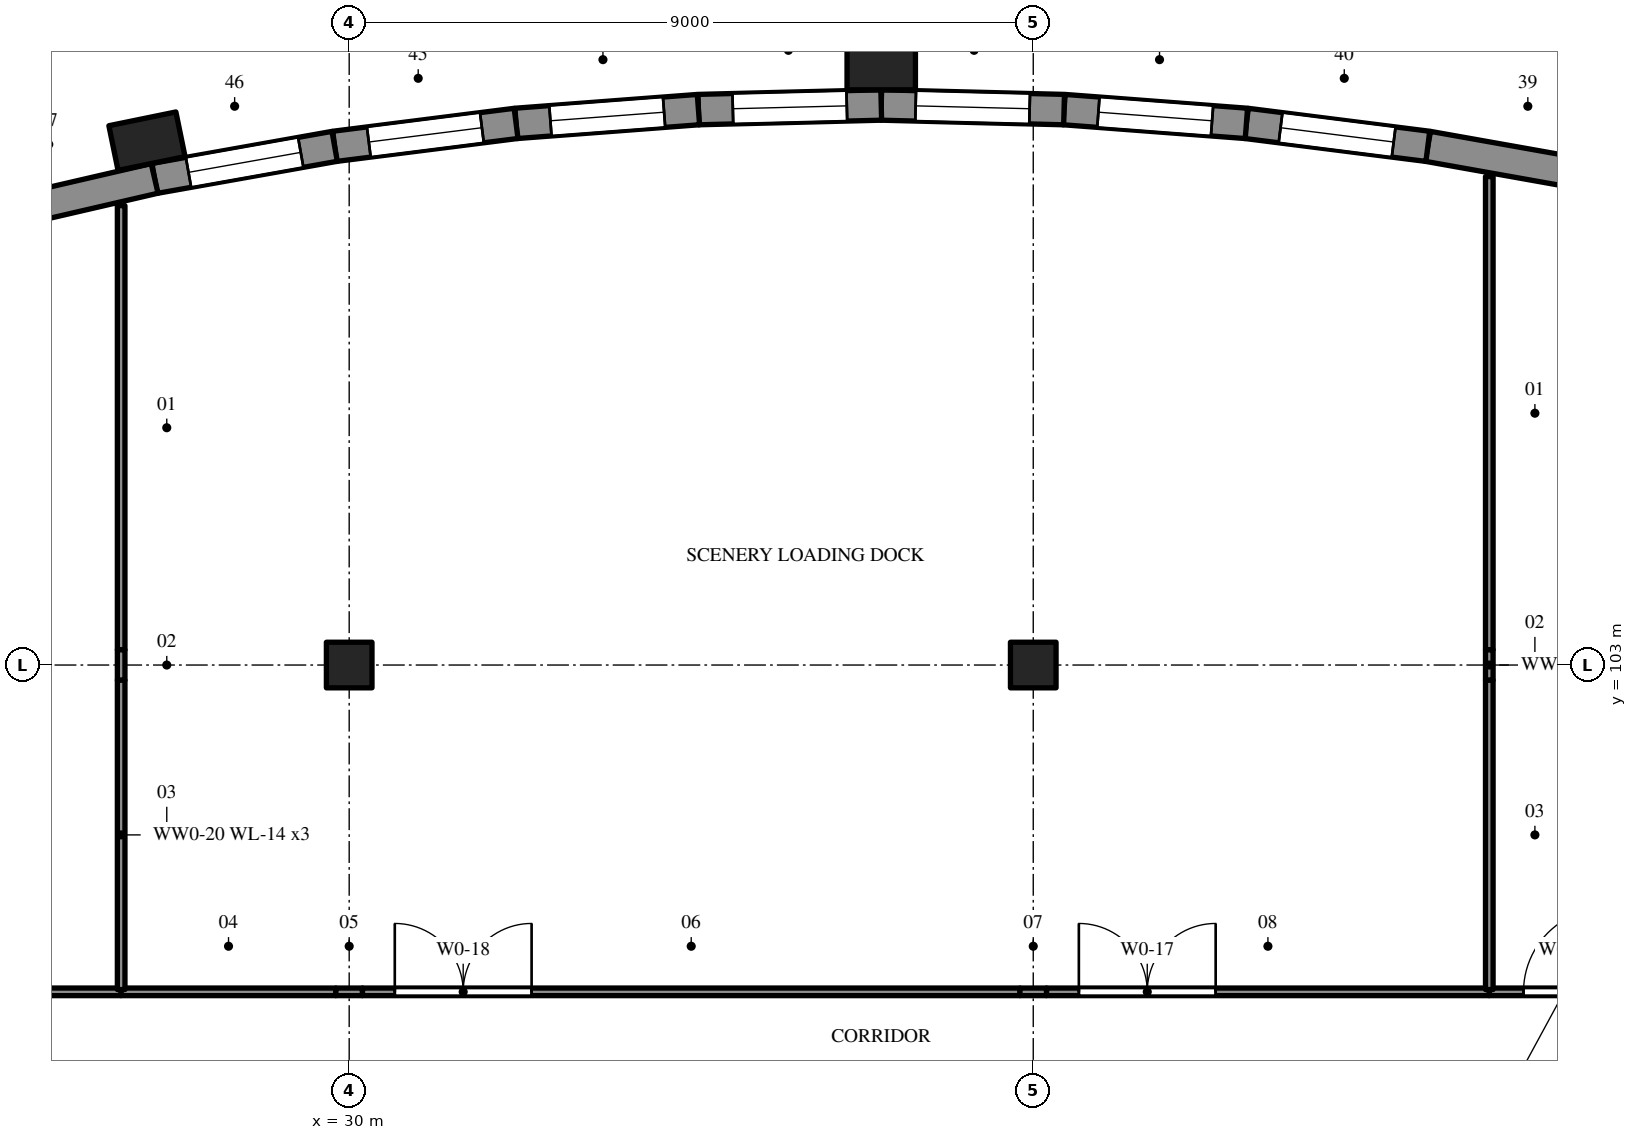
"""IFC4 building model, lengths in metres.
Left out: names, types, materials, properties, quantities, classifications, styles, units other than length and angle.
Written with IfcOpenShell. Run it as: python <this file> out.ifc"""

import sys

from ifc_helpers import new_model, si_unit, direction, frame, frame_2d, origin, origin_2d, place, context, subcontext, project, spatial, rectangle, extrude, element, fill, save


model = new_model("IFC4")
c1 = context("Model", 3, precision=1e-05, world=origin(), true_north=direction((0.0, 1.0)))
c2 = subcontext(c1, "Body", "Model", "MODEL_VIEW")
j1 = project(units=[si_unit("LENGTHUNIT", "METRE"), si_unit("PLANEANGLEUNIT", "RADIAN")], contexts=[c1])
p1 = place(None, origin())
s1 = spatial("IfcSite", under=j1, at=p1, CompositionType="ELEMENT")
p2 = place(p1, origin())
s2 = spatial("IfcBuilding", under=s1, at=p2, CompositionType="ELEMENT")
p3 = place(p2, origin())
s3 = spatial("IfcBuildingStorey", under=s2, at=p3, CompositionType="ELEMENT", Elevation=0.0)
for number, where, z_axis, x_axis in (
    (1, (30.0, 103.0, -0.25), (0.0, 0.0, 1.0), (1.0, 0.0, 0.0)),
    (2, (39.0, 103.0, -0.25), (0.0, 0.0, 1.0), (1.0, 0.0, 0.0)),
):
    element("IfcColumn", number, at=place(p3, frame(where, z_axis=z_axis, x_axis=x_axis)), inside=s3, PredefinedType="COLUMN", context=c2, shape_type="SweptSolid", body=[
        extrude(rectangle(XDim=0.6, YDim=0.6, at=origin_2d()), origin(), (0.0, 0.0, 1.0), 5.37),
    ])
p4 = place(p3, frame((46.56, 109.403, -0.25), z_axis=(0.0, 0.0, 1.0), x_axis=(-0.984524011381, 0.175249738987, 0.0)))
e3 = element("IfcWall", 3, at=p4, inside=s3, PredefinedType="SOLIDWALL", context=c2, shape_type="SweptSolid", body=[
    extrude(rectangle(XDim=2.406, YDim=0.4, at=frame_2d((1.203, 0.0))), origin(), (0.0, 0.0, 1.0), 5.65),
])
p5 = place(p3, frame((44.191, 109.825, -0.25), z_axis=(0.0, 0.0, 1.0), x_axis=(-0.99208939311, 0.125533406227, 0.0)))
e4 = element("IfcWall", 4, at=p5, inside=s3, PredefinedType="SOLIDWALL", context=c2, shape_type="SweptSolid", body=[
    extrude(rectangle(XDim=2.406, YDim=0.4, at=frame_2d((1.203, 0.0))), origin(), (0.0, 0.0, 1.0), 5.65),
])
p6 = place(p5, frame((0.453, 0.0, 1.15)))
e5 = element("IfcOpeningElement", 5, at=p6, cuts=e4, PredefinedType="OPENING", context=c2, shape_type="SweptSolid", body=[
    extrude(rectangle(XDim=1.5, YDim=2.1, at=frame_2d((0.75, 1.05))), frame((0.0, 0.21, 0.0), z_axis=(0.0, -1.0, 0.0), x_axis=(1.0, 0.0, 0.0)), (0.0, 0.0, 1.0), 0.42),
])
p7 = place(p3, frame((41.804, 110.127, -0.25), z_axis=(0.0, 0.0, 1.0), x_axis=(-0.997153910364, 0.075392831525, 0.0)))
e6 = element("IfcWall", 6, at=p7, inside=s3, PredefinedType="SOLIDWALL", context=c2, shape_type="SweptSolid", body=[
    extrude(rectangle(XDim=2.406, YDim=0.4, at=frame_2d((1.203, 0.0))), origin(), (0.0, 0.0, 1.0), 5.65),
])
p8 = place(p7, frame((0.453, 0.0, 1.15)))
e7 = element("IfcOpeningElement", 7, at=p8, cuts=e6, PredefinedType="OPENING", context=c2, shape_type="SweptSolid", body=[
    extrude(rectangle(XDim=1.5, YDim=2.1, at=frame_2d((0.75, 1.05))), frame((0.0, 0.21, 0.0), z_axis=(0.0, -1.0, 0.0), x_axis=(1.0, 0.0, 0.0)), (0.0, 0.0, 1.0), 0.42),
])
p9 = place(p3, frame((39.405, 110.308, -0.25), z_axis=(0.0, 0.0, 1.0), x_axis=(-0.999683321759, 0.025164582196, 0.0)))
e8 = element("IfcWall", 8, at=p9, inside=s3, PredefinedType="SOLIDWALL", context=c2, shape_type="SweptSolid", body=[
    extrude(rectangle(XDim=2.406, YDim=0.4, at=frame_2d((1.203, 0.0))), origin(), (0.0, 0.0, 1.0), 5.65),
])
p10 = place(p9, frame((0.453, 0.0, 1.15)))
e9 = element("IfcOpeningElement", 9, at=p10, cuts=e8, PredefinedType="OPENING", context=c2, shape_type="SweptSolid", body=[
    extrude(rectangle(XDim=1.5, YDim=2.1, at=frame_2d((0.75, 1.05))), frame((0.0, 0.21, 0.0), z_axis=(0.0, -1.0, 0.0), x_axis=(1.0, 0.0, 0.0)), (0.0, 0.0, 1.0), 0.42),
])
p11 = place(p3, frame((37.0, 110.369, -0.25), z_axis=(0.0, 0.0, 1.0), x_axis=(-0.999683321759, -0.025164582196, 0.0)))
e10 = element("IfcWall", 10, at=p11, inside=s3, PredefinedType="SOLIDWALL", context=c2, shape_type="SweptSolid", body=[
    extrude(rectangle(XDim=2.406, YDim=0.4, at=frame_2d((1.203, 0.0))), origin(), (0.0, 0.0, 1.0), 5.65),
])
p12 = place(p11, frame((0.453, 0.0, 1.15)))
e11 = element("IfcOpeningElement", 11, at=p12, cuts=e10, PredefinedType="OPENING", context=c2, shape_type="SweptSolid", body=[
    extrude(rectangle(XDim=1.5, YDim=2.1, at=frame_2d((0.75, 1.05))), frame((0.0, 0.21, 0.0), z_axis=(0.0, -1.0, 0.0), x_axis=(1.0, 0.0, 0.0)), (0.0, 0.0, 1.0), 0.42),
])
p13 = place(p3, frame((34.595, 110.308, -0.25), z_axis=(0.0, 0.0, 1.0), x_axis=(-0.997153910364, -0.075392831525, 0.0)))
e12 = element("IfcWall", 12, at=p13, inside=s3, PredefinedType="SOLIDWALL", context=c2, shape_type="SweptSolid", body=[
    extrude(rectangle(XDim=2.406, YDim=0.4, at=frame_2d((1.203, 0.0))), origin(), (0.0, 0.0, 1.0), 5.65),
])
p14 = place(p13, frame((0.453, 0.0, 1.15)))
e13 = element("IfcOpeningElement", 13, at=p14, cuts=e12, PredefinedType="OPENING", context=c2, shape_type="SweptSolid", body=[
    extrude(rectangle(XDim=1.5, YDim=2.1, at=frame_2d((0.75, 1.05))), frame((0.0, 0.21, 0.0), z_axis=(0.0, -1.0, 0.0), x_axis=(1.0, 0.0, 0.0)), (0.0, 0.0, 1.0), 0.42),
])
p15 = place(p3, frame((32.196, 110.127, -0.25), z_axis=(0.0, 0.0, 1.0), x_axis=(-0.99208939311, -0.125533406227, 0.0)))
e14 = element("IfcWall", 14, at=p15, inside=s3, PredefinedType="SOLIDWALL", context=c2, shape_type="SweptSolid", body=[
    extrude(rectangle(XDim=2.406, YDim=0.4, at=frame_2d((1.203, 0.0))), origin(), (0.0, 0.0, 1.0), 5.65),
])
p16 = place(p15, frame((0.453, 0.0, 1.15)))
e15 = element("IfcOpeningElement", 15, at=p16, cuts=e14, PredefinedType="OPENING", context=c2, shape_type="SweptSolid", body=[
    extrude(rectangle(XDim=1.5, YDim=2.1, at=frame_2d((0.75, 1.05))), frame((0.0, 0.21, 0.0), z_axis=(0.0, -1.0, 0.0), x_axis=(1.0, 0.0, 0.0)), (0.0, 0.0, 1.0), 0.42),
])
p17 = place(p3, frame((29.809, 109.825, -0.25), z_axis=(0.0, 0.0, 1.0), x_axis=(-0.984524011381, -0.175249738987, 0.0)))
e16 = element("IfcWall", 16, at=p17, inside=s3, PredefinedType="SOLIDWALL", context=c2, shape_type="SweptSolid", body=[
    extrude(rectangle(XDim=2.406, YDim=0.4, at=frame_2d((1.203, 0.0))), origin(), (0.0, 0.0, 1.0), 5.65),
])
p18 = place(p17, frame((0.453, 0.0, 1.15)))
e17 = element("IfcOpeningElement", 17, at=p18, cuts=e16, PredefinedType="OPENING", context=c2, shape_type="SweptSolid", body=[
    extrude(rectangle(XDim=1.5, YDim=2.1, at=frame_2d((0.75, 1.05))), frame((0.0, 0.21, 0.0), z_axis=(0.0, -1.0, 0.0), x_axis=(1.0, 0.0, 0.0)), (0.0, 0.0, 1.0), 0.42),
])
p19 = place(p3, frame((27.44, 109.403, -0.25), z_axis=(0.0, 0.0, 1.0), x_axis=(-0.974189274843, -0.225732710925, 0.0)))
e18 = element("IfcWall", 18, at=p19, inside=s3, PredefinedType="SOLIDWALL", context=c2, shape_type="SweptSolid", body=[
    extrude(rectangle(XDim=2.511, YDim=0.4, at=frame_2d((1.256, 0.0))), origin(), (0.0, 0.0, 1.0), 5.65),
])
for number, where, z_axis, x_axis in (
    (19, (27.34, 109.893, -0.25), (0.0, 0.0, 1.0), (-0.98, -0.201, 0.0)),
    (20, (37.0, 110.869, -0.25), (0.0, 0.0, 1.0), (-1.0, 0.0, 0.0)),
):
    element("IfcColumn", number, at=place(p3, frame(where, z_axis=z_axis, x_axis=x_axis)), inside=s3, PredefinedType="PILASTER", context=c2, shape_type="SweptSolid", body=[
        extrude(rectangle(XDim=0.9, YDim=0.6, at=origin_2d()), origin(), (0.0, 0.0, 1.0), 5.65),
    ])
p20 = place(p3, frame((21.175, 98.7, 0.0), z_axis=(0.0, 0.0, 1.0), x_axis=(1.0, 0.0, 0.0)))
e21 = element("IfcWall", 21, at=p20, inside=s3, PredefinedType="PARTITIONING", context=c2, shape_type="SweptSolid", body=[
    extrude(rectangle(XDim=5.825, YDim=0.1, at=frame_2d((2.913, 0.0))), origin(), (0.0, 0.0, 1.0), 5.12),
])
p21 = place(p20, frame((0.275, 0.0, 0.0)))
e22 = element("IfcOpeningElement", 22, at=p21, cuts=e21, PredefinedType="OPENING", context=c2, shape_type="SweptSolid", body=[
    extrude(rectangle(XDim=1.0, YDim=2.1, at=frame_2d((0.5, 1.05))), frame((0.0, 0.06, 0.0), z_axis=(0.0, -1.0, 0.0), x_axis=(1.0, 0.0, 0.0)), (0.0, 0.0, 1.0), 0.12),
])
p22 = place(p3, frame((27.0, 98.7, 0.0), z_axis=(0.0, 0.0, 1.0), x_axis=(1.0, 0.0, 0.0)))
e23 = element("IfcWall", 23, at=p22, inside=s3, PredefinedType="PARTITIONING", context=c2, shape_type="SweptSolid", body=[
    extrude(rectangle(XDim=2.825, YDim=0.1, at=frame_2d((1.413, 0.0))), origin(), (0.0, 0.0, 1.0), 5.12),
])
p23 = place(p3, frame((29.825, 98.7, 0.0), z_axis=(0.0, 0.0, 1.0), x_axis=(1.0, 0.0, 0.0)))
e24 = element("IfcWall", 24, at=p23, inside=s3, PredefinedType="PARTITIONING", context=c2, shape_type="SweptSolid", body=[
    extrude(rectangle(XDim=0.35, YDim=0.1, at=frame_2d((0.175, 0.0))), origin(), (0.0, 0.0, 1.0), 4.42),
])
p24 = place(p3, frame((30.175, 98.7, 0.0), z_axis=(0.0, 0.0, 1.0), x_axis=(1.0, 0.0, 0.0)))
e25 = element("IfcWall", 25, at=p24, inside=s3, PredefinedType="PARTITIONING", context=c2, shape_type="SweptSolid", body=[
    extrude(rectangle(XDim=8.65, YDim=0.1, at=frame_2d((4.325, 0.0))), origin(), (0.0, 0.0, 1.0), 5.12),
])
p25 = place(p24, frame((0.425, 0.0, 0.0)))
e26 = element("IfcOpeningElement", 26, at=p25, cuts=e25, PredefinedType="OPENING", context=c2, shape_type="SweptSolid", body=[
    extrude(rectangle(XDim=1.8, YDim=2.1, at=frame_2d((0.9, 1.05))), frame((0.0, 0.06, 0.0), z_axis=(0.0, -1.0, 0.0), x_axis=(1.0, 0.0, 0.0)), (0.0, 0.0, 1.0), 0.12),
])
p26 = place(p3, frame((38.825, 98.7, 0.0), z_axis=(0.0, 0.0, 1.0), x_axis=(1.0, 0.0, 0.0)))
e27 = element("IfcWall", 27, at=p26, inside=s3, PredefinedType="PARTITIONING", context=c2, shape_type="SweptSolid", body=[
    extrude(rectangle(XDim=0.35, YDim=0.1, at=frame_2d((0.175, 0.0))), origin(), (0.0, 0.0, 1.0), 4.42),
])
p27 = place(p3, frame((39.175, 98.7, 0.0), z_axis=(0.0, 0.0, 1.0), x_axis=(1.0, 0.0, 0.0)))
e28 = element("IfcWall", 28, at=p27, inside=s3, PredefinedType="PARTITIONING", context=c2, shape_type="SweptSolid", body=[
    extrude(rectangle(XDim=5.825, YDim=0.1, at=frame_2d((2.913, 0.0))), origin(), (0.0, 0.0, 1.0), 5.12),
])
p28 = place(p27, frame((0.425, 0.0, 0.0)))
e29 = element("IfcOpeningElement", 29, at=p28, cuts=e28, PredefinedType="OPENING", context=c2, shape_type="SweptSolid", body=[
    extrude(rectangle(XDim=1.8, YDim=2.1, at=frame_2d((0.9, 1.05))), frame((0.0, 0.06, 0.0), z_axis=(0.0, -1.0, 0.0), x_axis=(1.0, 0.0, 0.0)), (0.0, 0.0, 1.0), 0.12),
])
p29 = place(p3, frame((27.0, 109.044, 0.0), z_axis=(0.0, 0.0, 1.0), x_axis=(0.0, -1.0, 0.0)))
e30 = element("IfcWall", 30, at=p29, inside=s3, PredefinedType="PARTITIONING", context=c2, shape_type="SweptSolid", body=[
    extrude(rectangle(XDim=5.844, YDim=0.1, at=frame_2d((2.922, 0.0))), origin(), (0.0, 0.0, 1.0), 5.12),
])
p30 = place(p3, frame((27.0, 103.2, 0.0), z_axis=(0.0, 0.0, 1.0), x_axis=(0.0, -1.0, 0.0)))
e31 = element("IfcWall", 31, at=p30, inside=s3, PredefinedType="PARTITIONING", context=c2, shape_type="SweptSolid", body=[
    extrude(rectangle(XDim=0.4, YDim=0.1, at=frame_2d((0.2, 0.0))), origin(), (0.0, 0.0, 1.0), 4.32),
])
p31 = place(p3, frame((27.0, 102.8, 0.0), z_axis=(0.0, 0.0, 1.0), x_axis=(0.0, -1.0, 0.0)))
e32 = element("IfcWall", 32, at=p31, inside=s3, PredefinedType="PARTITIONING", context=c2, shape_type="SweptSolid", body=[
    extrude(rectangle(XDim=4.07, YDim=0.1, at=frame_2d((2.035, 0.0))), origin(), (0.0, 0.0, 1.0), 5.12),
])
p32 = place(p3, frame((45.0, 98.7, 0.0), z_axis=(0.0, 0.0, 1.0), x_axis=(1.0, 0.0, 0.0)))
e33 = element("IfcWall", 33, at=p32, inside=s3, PredefinedType="PARTITIONING", context=c2, shape_type="SweptSolid", body=[
    extrude(rectangle(XDim=1.97, YDim=0.1, at=frame_2d((0.985, 0.0))), origin(), (0.0, 0.0, 1.0), 5.12),
])
p33 = place(p32, frame((0.45, 0.0, 0.0)))
e34 = element("IfcOpeningElement", 34, at=p33, cuts=e33, PredefinedType="OPENING", context=c2, shape_type="SweptSolid", body=[
    extrude(rectangle(XDim=1.1, YDim=2.1, at=frame_2d((0.55, 1.05))), frame((0.0, 0.06, 0.0), z_axis=(0.0, -1.0, 0.0), x_axis=(1.0, 0.0, 0.0)), (0.0, 0.0, 1.0), 0.12),
])
p34 = place(p3, frame((45.0, 109.427, 0.0), z_axis=(0.0, 0.0, 1.0), x_axis=(0.0, -1.0, 0.0)))
e35 = element("IfcWall", 35, at=p34, inside=s3, PredefinedType="PARTITIONING", context=c2, shape_type="SweptSolid", body=[
    extrude(rectangle(XDim=6.227, YDim=0.1, at=frame_2d((3.113, 0.0))), origin(), (0.0, 0.0, 1.0), 5.12),
])
p35 = place(p3, frame((45.0, 103.2, 0.0), z_axis=(0.0, 0.0, 1.0), x_axis=(0.0, -1.0, 0.0)))
e36 = element("IfcWall", 36, at=p35, inside=s3, PredefinedType="PARTITIONING", context=c2, shape_type="SweptSolid", body=[
    extrude(rectangle(XDim=0.4, YDim=0.1, at=frame_2d((0.2, 0.0))), origin(), (0.0, 0.0, 1.0), 4.32),
])
p36 = place(p3, frame((45.0, 102.8, 0.0), z_axis=(0.0, 0.0, 1.0), x_axis=(0.0, -1.0, 0.0)))
e37 = element("IfcWall", 37, at=p36, inside=s3, PredefinedType="PARTITIONING", context=c2, shape_type="SweptSolid", body=[
    extrude(rectangle(XDim=4.07, YDim=0.1, at=frame_2d((2.035, 0.0))), origin(), (0.0, 0.0, 1.0), 5.12),
])
p37 = place(p6, origin())
e38 = element("IfcWindow", 38, at=p37, inside=s3, PartitioningType="SINGLE_PANEL", PredefinedType="WINDOW", context=c2, shape_type="SweptSolid", body=[
    extrude(rectangle(XDim=1.5, YDim=2.1, at=frame_2d((0.75, 1.05))), frame((0.0, 0.03, 0.0), z_axis=(0.0, -1.0, 0.0), x_axis=(1.0, 0.0, 0.0)), (0.0, 0.0, 1.0), 0.06),
])
fill(e5, e38)
p38 = place(p8, origin())
e39 = element("IfcWindow", 39, at=p38, inside=s3, PartitioningType="SINGLE_PANEL", PredefinedType="WINDOW", context=c2, shape_type="SweptSolid", body=[
    extrude(rectangle(XDim=1.5, YDim=2.1, at=frame_2d((0.75, 1.05))), frame((0.0, 0.03, 0.0), z_axis=(0.0, -1.0, 0.0), x_axis=(1.0, 0.0, 0.0)), (0.0, 0.0, 1.0), 0.06),
])
fill(e7, e39)
p39 = place(p10, origin())
e40 = element("IfcWindow", 40, at=p39, inside=s3, PartitioningType="SINGLE_PANEL", PredefinedType="WINDOW", context=c2, shape_type="SweptSolid", body=[
    extrude(rectangle(XDim=1.5, YDim=2.1, at=frame_2d((0.75, 1.05))), frame((0.0, 0.03, 0.0), z_axis=(0.0, -1.0, 0.0), x_axis=(1.0, 0.0, 0.0)), (0.0, 0.0, 1.0), 0.06),
])
fill(e9, e40)
p40 = place(p12, origin())
e41 = element("IfcWindow", 41, at=p40, inside=s3, PartitioningType="SINGLE_PANEL", PredefinedType="WINDOW", context=c2, shape_type="SweptSolid", body=[
    extrude(rectangle(XDim=1.5, YDim=2.1, at=frame_2d((0.75, 1.05))), frame((0.0, 0.03, 0.0), z_axis=(0.0, -1.0, 0.0), x_axis=(1.0, 0.0, 0.0)), (0.0, 0.0, 1.0), 0.06),
])
fill(e11, e41)
p41 = place(p14, origin())
e42 = element("IfcWindow", 42, at=p41, inside=s3, PartitioningType="SINGLE_PANEL", PredefinedType="WINDOW", context=c2, shape_type="SweptSolid", body=[
    extrude(rectangle(XDim=1.5, YDim=2.1, at=frame_2d((0.75, 1.05))), frame((0.0, 0.03, 0.0), z_axis=(0.0, -1.0, 0.0), x_axis=(1.0, 0.0, 0.0)), (0.0, 0.0, 1.0), 0.06),
])
fill(e13, e42)
p42 = place(p16, origin())
e43 = element("IfcWindow", 43, at=p42, inside=s3, PartitioningType="SINGLE_PANEL", PredefinedType="WINDOW", context=c2, shape_type="SweptSolid", body=[
    extrude(rectangle(XDim=1.5, YDim=2.1, at=frame_2d((0.75, 1.05))), frame((0.0, 0.03, 0.0), z_axis=(0.0, -1.0, 0.0), x_axis=(1.0, 0.0, 0.0)), (0.0, 0.0, 1.0), 0.06),
])
fill(e15, e43)
p43 = place(p18, origin())
e44 = element("IfcWindow", 44, at=p43, inside=s3, PartitioningType="SINGLE_PANEL", PredefinedType="WINDOW", context=c2, shape_type="SweptSolid", body=[
    extrude(rectangle(XDim=1.5, YDim=2.1, at=frame_2d((0.75, 1.05))), frame((0.0, 0.03, 0.0), z_axis=(0.0, -1.0, 0.0), x_axis=(1.0, 0.0, 0.0)), (0.0, 0.0, 1.0), 0.06),
])
fill(e17, e44)
p44 = place(p28, origin())
e45 = element("IfcDoor", 45, at=p44, inside=s3, OperationType="DOUBLE_DOOR_SINGLE_SWING", PredefinedType="DOOR", context=c2, shape_type="SweptSolid", body=[
    extrude(rectangle(XDim=1.8, YDim=2.1, at=frame_2d((0.9, 1.05))), frame((0.0, 0.025, 0.0), z_axis=(0.0, -1.0, 0.0), x_axis=(1.0, 0.0, 0.0)), (0.0, 0.0, 1.0), 0.05),
])
fill(e29, e45)
p45 = place(p25, origin())
e46 = element("IfcDoor", 46, at=p45, inside=s3, OperationType="DOUBLE_DOOR_SINGLE_SWING", PredefinedType="DOOR", context=c2, shape_type="SweptSolid", body=[
    extrude(rectangle(XDim=1.8, YDim=2.1, at=frame_2d((0.9, 1.05))), frame((0.0, 0.025, 0.0), z_axis=(0.0, -1.0, 0.0), x_axis=(1.0, 0.0, 0.0)), (0.0, 0.0, 1.0), 0.05),
])
fill(e26, e46)
p46 = place(p33, origin())
e47 = element("IfcDoor", 47, at=p46, inside=s3, OperationType="SINGLE_SWING_RIGHT", PredefinedType="DOOR", context=c2, shape_type="SweptSolid", body=[
    extrude(rectangle(XDim=1.1, YDim=2.1, at=frame_2d((0.55, 1.05))), frame((0.0, 0.025, 0.0), z_axis=(0.0, -1.0, 0.0), x_axis=(1.0, 0.0, 0.0)), (0.0, 0.0, 1.0), 0.05),
])
fill(e34, e47)
save(model, sys.argv[1])
